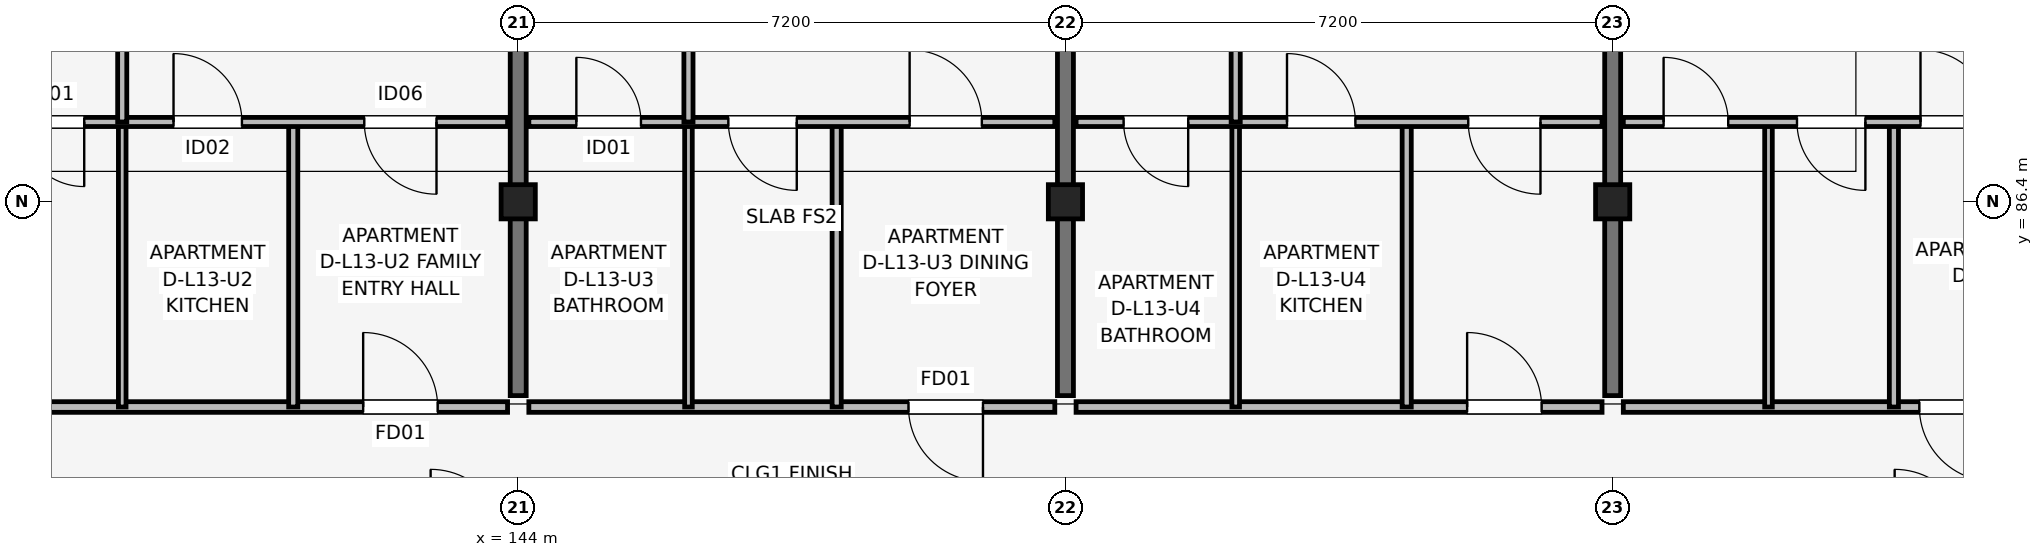
"""IFC4 building model, lengths in metres.
Left out: names, types, materials, properties, quantities, classifications, styles, units other than length and angle.
Written with IfcOpenShell. Run it as: python <this file> out.ifc"""

import sys

from ifc_helpers import new_model, si_unit, direction, frame, frame_2d, origin, origin_2d, place, context, subcontext, project, spatial, rectangle, extrude, element, fill, save


model = new_model("IFC4")
c1 = context("Model", 3, precision=1e-05, world=origin(), true_north=direction((0.0, 1.0)))
c2 = subcontext(c1, "Body", "Model", "MODEL_VIEW")
j1 = project(units=[si_unit("LENGTHUNIT", "METRE"), si_unit("PLANEANGLEUNIT", "RADIAN")], contexts=[c1])
p1 = place(None, origin())
s1 = spatial("IfcSite", under=j1, at=p1, CompositionType="ELEMENT")
p2 = place(p1, origin())
s2 = spatial("IfcBuilding", under=s1, at=p2, CompositionType="ELEMENT")
p3 = place(p2, frame((0.0, 0.0, 43.35)))
s3 = spatial("IfcBuildingStorey", under=s2, at=p3, CompositionType="ELEMENT", Elevation=43.35)
for number, where, z_axis, x_axis in (
    (1, (144.0, 86.4, 0.0), (0.0, 0.0, 1.0), (1.0, 0.0, 0.0)),
    (2, (151.2, 86.4, 0.0), (0.0, 0.0, 1.0), (1.0, 0.0, 0.0)),
    (3, (158.4, 86.4, 0.0), (0.0, 0.0, 1.0), (1.0, 0.0, 0.0)),
):
    element("IfcColumn", number, at=place(p3, frame(where, z_axis=z_axis, x_axis=x_axis)), inside=s3, PredefinedType="COLUMN", context=c2, shape_type="SweptSolid", body=[
        extrude(rectangle(XDim=0.45, YDim=0.45, at=origin_2d()), origin(), (0.0, 0.0, 1.0), 3.15),
    ])
for number, where, z_axis, x_axis in (
    (4, (144.0, 83.85, 0.0), (0.0, 0.0, 1.0), (0.0, 1.0, 0.0)),
    (5, (151.2, 83.85, 0.0), (0.0, 0.0, 1.0), (0.0, 1.0, 0.0)),
    (6, (158.4, 83.85, 0.0), (0.0, 0.0, 1.0), (0.0, 1.0, 0.0)),
):
    element("IfcWall", number, at=place(p3, frame(where, z_axis=z_axis, x_axis=x_axis)), inside=s3, PredefinedType="SHEAR", context=c2, shape_type="SweptSolid", body=[
        extrude(rectangle(XDim=9.4, YDim=0.21, at=frame_2d((4.7, 0.0))), origin(), (0.0, 0.0, 1.0), 3.15),
    ])
p4 = place(p3, frame((136.94, 83.7, 0.0), z_axis=(0.0, 0.0, 1.0), x_axis=(1.0, 0.0, 0.0)))
e7 = element("IfcWall", 7, at=p4, inside=s3, PredefinedType="PARTITIONING", context=c2, shape_type="SweptSolid", body=[
    extrude(rectangle(XDim=6.92, YDim=0.14, at=frame_2d((3.46, 0.0))), origin(), (0.0, 0.0, 1.0), 2.38),
])
p5 = place(p4, frame((5.02, 0.0, 0.0)))
e8 = element("IfcOpeningElement", 8, at=p5, cuts=e7, PredefinedType="OPENING", context=c2, shape_type="SweptSolid", body=[
    extrude(rectangle(XDim=0.98, YDim=2.1, at=frame_2d((0.49, 1.05))), frame((0.0, 0.08, 0.0), z_axis=(0.0, -1.0, 0.0), x_axis=(1.0, 0.0, 0.0)), (0.0, 0.0, 1.0), 0.16),
])
p6 = place(p3, frame((138.79, 83.7, 0.0), z_axis=(0.0, 0.0, 1.0), x_axis=(0.0, 1.0, 0.0)))
e9 = element("IfcWall", 9, at=p6, inside=s3, PredefinedType="PARTITIONING", context=c2, shape_type="SweptSolid", body=[
    extrude(rectangle(XDim=3.75, YDim=0.1, at=frame_2d((1.875, 0.0))), origin(), (0.0, 0.0, 1.0), 2.38),
])
p7 = place(p3, frame((141.04, 83.7, 0.0), z_axis=(0.0, 0.0, 1.0), x_axis=(0.0, 1.0, 0.0)))
e10 = element("IfcWall", 10, at=p7, inside=s3, PredefinedType="PARTITIONING", context=c2, shape_type="SweptSolid", body=[
    extrude(rectangle(XDim=3.75, YDim=0.12, at=frame_2d((1.875, 0.0))), origin(), (0.0, 0.0, 1.0), 2.38),
])
p8 = place(p3, frame((136.94, 87.45, 0.0), z_axis=(0.0, 0.0, 1.0), x_axis=(1.0, 0.0, 0.0)))
e11 = element("IfcWall", 11, at=p8, inside=s3, PredefinedType="PARTITIONING", context=c2, shape_type="SweptSolid", body=[
    extrude(rectangle(XDim=6.92, YDim=0.12, at=frame_2d((3.46, 0.0))), origin(), (0.0, 0.0, 1.0), 2.38),
])
p9 = place(p8, frame((1.35, 0.0, 0.0), z_axis=(0.0, 0.0, 1.0), x_axis=(-1.0, 0.0, 0.0)))
e12 = element("IfcOpeningElement", 12, at=p9, cuts=e11, PredefinedType="OPENING", context=c2, shape_type="SweptSolid", body=[
    extrude(rectangle(XDim=0.85, YDim=2.08, at=frame_2d((0.425, 1.04))), frame((0.0, 0.07, 0.0), z_axis=(0.0, -1.0, 0.0), x_axis=(1.0, 0.0, 0.0)), (0.0, 0.0, 1.0), 0.14),
])
p10 = place(p8, frame((2.525, 0.0, 0.0)))
e13 = element("IfcOpeningElement", 13, at=p10, cuts=e11, PredefinedType="OPENING", context=c2, shape_type="SweptSolid", body=[
    extrude(rectangle(XDim=0.9, YDim=2.08, at=frame_2d((0.45, 1.04))), frame((0.0, 0.07, 0.0), z_axis=(0.0, -1.0, 0.0), x_axis=(1.0, 0.0, 0.0)), (0.0, 0.0, 1.0), 0.14),
])
p11 = place(p8, frame((5.985, 0.0, 0.0), z_axis=(0.0, 0.0, 1.0), x_axis=(-1.0, 0.0, 0.0)))
e14 = element("IfcOpeningElement", 14, at=p11, cuts=e11, PredefinedType="OPENING", context=c2, shape_type="SweptSolid", body=[
    extrude(rectangle(XDim=0.95, YDim=2.08, at=frame_2d((0.475, 1.04))), frame((0.0, 0.07, 0.0), z_axis=(0.0, -1.0, 0.0), x_axis=(1.0, 0.0, 0.0)), (0.0, 0.0, 1.0), 0.14),
])
p12 = place(p3, frame((138.79, 87.45, 0.0), z_axis=(0.0, 0.0, 1.0), x_axis=(0.0, 1.0, 0.0)))
e15 = element("IfcWall", 15, at=p12, inside=s3, PredefinedType="PARTITIONING", context=c2, shape_type="SweptSolid", body=[
    extrude(rectangle(XDim=5.85, YDim=0.12, at=frame_2d((2.925, 0.0))), origin(), (0.0, 0.0, 1.0), 2.38),
])
p13 = place(p12, frame((2.475, 0.0, 0.0)))
e16 = element("IfcOpeningElement", 16, at=p13, cuts=e15, PredefinedType="OPENING", context=c2, shape_type="SweptSolid", body=[
    extrude(rectangle(XDim=0.9, YDim=2.08, at=frame_2d((0.45, 1.04))), frame((0.0, 0.07, 0.0), z_axis=(0.0, -1.0, 0.0), x_axis=(1.0, 0.0, 0.0)), (0.0, 0.0, 1.0), 0.14),
])
p14 = place(p3, frame((144.14, 83.7, 0.0), z_axis=(0.0, 0.0, 1.0), x_axis=(1.0, 0.0, 0.0)))
e17 = element("IfcWall", 17, at=p14, inside=s3, PredefinedType="PARTITIONING", context=c2, shape_type="SweptSolid", body=[
    extrude(rectangle(XDim=6.92, YDim=0.14, at=frame_2d((3.46, 0.0))), origin(), (0.0, 0.0, 1.0), 2.38),
])
p15 = place(p14, frame((5.975, 0.0, 0.0), z_axis=(0.0, 0.0, 1.0), x_axis=(-1.0, 0.0, 0.0)))
e18 = element("IfcOpeningElement", 18, at=p15, cuts=e17, PredefinedType="OPENING", context=c2, shape_type="SweptSolid", body=[
    extrude(rectangle(XDim=0.98, YDim=2.1, at=frame_2d((0.49, 1.05))), frame((0.0, 0.08, 0.0), z_axis=(0.0, -1.0, 0.0), x_axis=(1.0, 0.0, 0.0)), (0.0, 0.0, 1.0), 0.16),
])
p16 = place(p3, frame((146.24, 83.7, 0.0), z_axis=(0.0, 0.0, 1.0), x_axis=(0.0, 1.0, 0.0)))
e19 = element("IfcWall", 19, at=p16, inside=s3, PredefinedType="PARTITIONING", context=c2, shape_type="SweptSolid", body=[
    extrude(rectangle(XDim=3.75, YDim=0.1, at=frame_2d((1.875, 0.0))), origin(), (0.0, 0.0, 1.0), 2.38),
])
p17 = place(p3, frame((148.19, 83.7, 0.0), z_axis=(0.0, 0.0, 1.0), x_axis=(0.0, 1.0, 0.0)))
e20 = element("IfcWall", 20, at=p17, inside=s3, PredefinedType="PARTITIONING", context=c2, shape_type="SweptSolid", body=[
    extrude(rectangle(XDim=3.75, YDim=0.12, at=frame_2d((1.875, 0.0))), origin(), (0.0, 0.0, 1.0), 2.38),
])
p18 = place(p3, frame((144.14, 87.45, 0.0), z_axis=(0.0, 0.0, 1.0), x_axis=(1.0, 0.0, 0.0)))
e21 = element("IfcWall", 21, at=p18, inside=s3, PredefinedType="PARTITIONING", context=c2, shape_type="SweptSolid", body=[
    extrude(rectangle(XDim=6.92, YDim=0.12, at=frame_2d((3.46, 0.0))), origin(), (0.0, 0.0, 1.0), 2.38),
])
p19 = place(p18, frame((0.625, 0.0, 0.0)))
e22 = element("IfcOpeningElement", 22, at=p19, cuts=e21, PredefinedType="OPENING", context=c2, shape_type="SweptSolid", body=[
    extrude(rectangle(XDim=0.85, YDim=2.08, at=frame_2d((0.425, 1.04))), frame((0.0, 0.07, 0.0), z_axis=(0.0, -1.0, 0.0), x_axis=(1.0, 0.0, 0.0)), (0.0, 0.0, 1.0), 0.14),
])
p20 = place(p18, frame((3.525, 0.0, 0.0), z_axis=(0.0, 0.0, 1.0), x_axis=(-1.0, 0.0, 0.0)))
e23 = element("IfcOpeningElement", 23, at=p20, cuts=e21, PredefinedType="OPENING", context=c2, shape_type="SweptSolid", body=[
    extrude(rectangle(XDim=0.9, YDim=2.08, at=frame_2d((0.45, 1.04))), frame((0.0, 0.07, 0.0), z_axis=(0.0, -1.0, 0.0), x_axis=(1.0, 0.0, 0.0)), (0.0, 0.0, 1.0), 0.14),
])
p21 = place(p18, frame((5.01, 0.0, 0.0)))
e24 = element("IfcOpeningElement", 24, at=p21, cuts=e21, PredefinedType="OPENING", context=c2, shape_type="SweptSolid", body=[
    extrude(rectangle(XDim=0.95, YDim=2.08, at=frame_2d((0.475, 1.04))), frame((0.0, 0.07, 0.0), z_axis=(0.0, -1.0, 0.0), x_axis=(1.0, 0.0, 0.0)), (0.0, 0.0, 1.0), 0.14),
])
p22 = place(p3, frame((146.24, 87.45, 0.0), z_axis=(0.0, 0.0, 1.0), x_axis=(0.0, 1.0, 0.0)))
e25 = element("IfcWall", 25, at=p22, inside=s3, PredefinedType="PARTITIONING", context=c2, shape_type="SweptSolid", body=[
    extrude(rectangle(XDim=5.85, YDim=0.12, at=frame_2d((2.925, 0.0))), origin(), (0.0, 0.0, 1.0), 2.38),
])
p23 = place(p22, frame((3.375, 0.0, 0.0), z_axis=(0.0, 0.0, 1.0), x_axis=(-1.0, 0.0, 0.0)))
e26 = element("IfcOpeningElement", 26, at=p23, cuts=e25, PredefinedType="OPENING", context=c2, shape_type="SweptSolid", body=[
    extrude(rectangle(XDim=0.9, YDim=2.08, at=frame_2d((0.45, 1.04))), frame((0.0, 0.07, 0.0), z_axis=(0.0, -1.0, 0.0), x_axis=(1.0, 0.0, 0.0)), (0.0, 0.0, 1.0), 0.14),
])
p24 = place(p3, frame((151.34, 83.7, 0.0), z_axis=(0.0, 0.0, 1.0), x_axis=(1.0, 0.0, 0.0)))
e27 = element("IfcWall", 27, at=p24, inside=s3, PredefinedType="PARTITIONING", context=c2, shape_type="SweptSolid", body=[
    extrude(rectangle(XDim=6.92, YDim=0.14, at=frame_2d((3.46, 0.0))), origin(), (0.0, 0.0, 1.0), 2.38),
])
p25 = place(p24, frame((5.145, 0.0, 0.0)))
e28 = element("IfcOpeningElement", 28, at=p25, cuts=e27, PredefinedType="OPENING", context=c2, shape_type="SweptSolid", body=[
    extrude(rectangle(XDim=0.98, YDim=2.1, at=frame_2d((0.49, 1.05))), frame((0.0, 0.08, 0.0), z_axis=(0.0, -1.0, 0.0), x_axis=(1.0, 0.0, 0.0)), (0.0, 0.0, 1.0), 0.16),
])
p26 = place(p3, frame((153.44, 83.7, 0.0), z_axis=(0.0, 0.0, 1.0), x_axis=(0.0, 1.0, 0.0)))
e29 = element("IfcWall", 29, at=p26, inside=s3, PredefinedType="PARTITIONING", context=c2, shape_type="SweptSolid", body=[
    extrude(rectangle(XDim=3.75, YDim=0.1, at=frame_2d((1.875, 0.0))), origin(), (0.0, 0.0, 1.0), 2.38),
])
p27 = place(p3, frame((155.69, 83.7, 0.0), z_axis=(0.0, 0.0, 1.0), x_axis=(0.0, 1.0, 0.0)))
e30 = element("IfcWall", 30, at=p27, inside=s3, PredefinedType="PARTITIONING", context=c2, shape_type="SweptSolid", body=[
    extrude(rectangle(XDim=3.75, YDim=0.12, at=frame_2d((1.875, 0.0))), origin(), (0.0, 0.0, 1.0), 2.38),
])
p28 = place(p3, frame((151.34, 87.45, 0.0), z_axis=(0.0, 0.0, 1.0), x_axis=(1.0, 0.0, 0.0)))
e31 = element("IfcWall", 31, at=p28, inside=s3, PredefinedType="PARTITIONING", context=c2, shape_type="SweptSolid", body=[
    extrude(rectangle(XDim=6.92, YDim=0.12, at=frame_2d((3.46, 0.0))), origin(), (0.0, 0.0, 1.0), 2.38),
])
p29 = place(p28, frame((1.475, 0.0, 0.0), z_axis=(0.0, 0.0, 1.0), x_axis=(-1.0, 0.0, 0.0)))
e32 = element("IfcOpeningElement", 32, at=p29, cuts=e31, PredefinedType="OPENING", context=c2, shape_type="SweptSolid", body=[
    extrude(rectangle(XDim=0.85, YDim=2.08, at=frame_2d((0.425, 1.04))), frame((0.0, 0.07, 0.0), z_axis=(0.0, -1.0, 0.0), x_axis=(1.0, 0.0, 0.0)), (0.0, 0.0, 1.0), 0.14),
])
p30 = place(p28, frame((2.775, 0.0, 0.0)))
e33 = element("IfcOpeningElement", 33, at=p30, cuts=e31, PredefinedType="OPENING", context=c2, shape_type="SweptSolid", body=[
    extrude(rectangle(XDim=0.9, YDim=2.08, at=frame_2d((0.45, 1.04))), frame((0.0, 0.07, 0.0), z_axis=(0.0, -1.0, 0.0), x_axis=(1.0, 0.0, 0.0)), (0.0, 0.0, 1.0), 0.14),
])
p31 = place(p28, frame((6.11, 0.0, 0.0), z_axis=(0.0, 0.0, 1.0), x_axis=(-1.0, 0.0, 0.0)))
e34 = element("IfcOpeningElement", 34, at=p31, cuts=e31, PredefinedType="OPENING", context=c2, shape_type="SweptSolid", body=[
    extrude(rectangle(XDim=0.95, YDim=2.08, at=frame_2d((0.475, 1.04))), frame((0.0, 0.07, 0.0), z_axis=(0.0, -1.0, 0.0), x_axis=(1.0, 0.0, 0.0)), (0.0, 0.0, 1.0), 0.14),
])
p32 = place(p3, frame((153.44, 87.45, 0.0), z_axis=(0.0, 0.0, 1.0), x_axis=(0.0, 1.0, 0.0)))
e35 = element("IfcWall", 35, at=p32, inside=s3, PredefinedType="PARTITIONING", context=c2, shape_type="SweptSolid", body=[
    extrude(rectangle(XDim=5.85, YDim=0.12, at=frame_2d((2.925, 0.0))), origin(), (0.0, 0.0, 1.0), 2.38),
])
p33 = place(p32, frame((2.475, 0.0, 0.0)))
e36 = element("IfcOpeningElement", 36, at=p33, cuts=e35, PredefinedType="OPENING", context=c2, shape_type="SweptSolid", body=[
    extrude(rectangle(XDim=0.9, YDim=2.08, at=frame_2d((0.45, 1.04))), frame((0.0, 0.07, 0.0), z_axis=(0.0, -1.0, 0.0), x_axis=(1.0, 0.0, 0.0)), (0.0, 0.0, 1.0), 0.14),
])
p34 = place(p3, frame((158.54, 83.7, 0.0), z_axis=(0.0, 0.0, 1.0), x_axis=(1.0, 0.0, 0.0)))
e37 = element("IfcWall", 37, at=p34, inside=s3, PredefinedType="PARTITIONING", context=c2, shape_type="SweptSolid", body=[
    extrude(rectangle(XDim=6.92, YDim=0.14, at=frame_2d((3.46, 0.0))), origin(), (0.0, 0.0, 1.0), 2.38),
])
p35 = place(p34, frame((4.875, 0.0, 0.0), z_axis=(0.0, 0.0, 1.0), x_axis=(-1.0, 0.0, 0.0)))
e38 = element("IfcOpeningElement", 38, at=p35, cuts=e37, PredefinedType="OPENING", context=c2, shape_type="SweptSolid", body=[
    extrude(rectangle(XDim=0.98, YDim=2.1, at=frame_2d((0.49, 1.05))), frame((0.0, 0.08, 0.0), z_axis=(0.0, -1.0, 0.0), x_axis=(1.0, 0.0, 0.0)), (0.0, 0.0, 1.0), 0.16),
])
p36 = place(p3, frame((160.45, 83.7, 0.0), z_axis=(0.0, 0.0, 1.0), x_axis=(0.0, 1.0, 0.0)))
e39 = element("IfcWall", 39, at=p36, inside=s3, PredefinedType="PARTITIONING", context=c2, shape_type="SweptSolid", body=[
    extrude(rectangle(XDim=3.75, YDim=0.1, at=frame_2d((1.875, 0.0))), origin(), (0.0, 0.0, 1.0), 2.38),
])
p37 = place(p3, frame((162.1, 83.7, 0.0), z_axis=(0.0, 0.0, 1.0), x_axis=(0.0, 1.0, 0.0)))
e40 = element("IfcWall", 40, at=p37, inside=s3, PredefinedType="PARTITIONING", context=c2, shape_type="SweptSolid", body=[
    extrude(rectangle(XDim=3.75, YDim=0.12, at=frame_2d((1.875, 0.0))), origin(), (0.0, 0.0, 1.0), 2.38),
])
p38 = place(p3, frame((158.54, 87.45, 0.0), z_axis=(0.0, 0.0, 1.0), x_axis=(1.0, 0.0, 0.0)))
e41 = element("IfcWall", 41, at=p38, inside=s3, PredefinedType="PARTITIONING", context=c2, shape_type="SweptSolid", body=[
    extrude(rectangle(XDim=6.92, YDim=0.12, at=frame_2d((3.46, 0.0))), origin(), (0.0, 0.0, 1.0), 2.38),
])
p39 = place(p38, frame((0.53, 0.0, 0.0)))
e42 = element("IfcOpeningElement", 42, at=p39, cuts=e41, PredefinedType="OPENING", context=c2, shape_type="SweptSolid", body=[
    extrude(rectangle(XDim=0.85, YDim=2.08, at=frame_2d((0.425, 1.04))), frame((0.0, 0.07, 0.0), z_axis=(0.0, -1.0, 0.0), x_axis=(1.0, 0.0, 0.0)), (0.0, 0.0, 1.0), 0.14),
])
p40 = place(p38, frame((3.185, 0.0, 0.0), z_axis=(0.0, 0.0, 1.0), x_axis=(-1.0, 0.0, 0.0)))
e43 = element("IfcOpeningElement", 43, at=p40, cuts=e41, PredefinedType="OPENING", context=c2, shape_type="SweptSolid", body=[
    extrude(rectangle(XDim=0.9, YDim=2.08, at=frame_2d((0.45, 1.04))), frame((0.0, 0.07, 0.0), z_axis=(0.0, -1.0, 0.0), x_axis=(1.0, 0.0, 0.0)), (0.0, 0.0, 1.0), 0.14),
])
p41 = place(p38, frame((3.91, 0.0, 0.0)))
e44 = element("IfcOpeningElement", 44, at=p41, cuts=e41, PredefinedType="OPENING", context=c2, shape_type="SweptSolid", body=[
    extrude(rectangle(XDim=0.95, YDim=2.08, at=frame_2d((0.475, 1.04))), frame((0.0, 0.07, 0.0), z_axis=(0.0, -1.0, 0.0), x_axis=(1.0, 0.0, 0.0)), (0.0, 0.0, 1.0), 0.14),
])
p42 = place(p5, origin())
e45 = element("IfcDoor", 45, at=p42, inside=s3, OperationType="SINGLE_SWING_LEFT", PredefinedType="DOOR", context=c2, shape_type="SweptSolid", body=[
    extrude(rectangle(XDim=0.98, YDim=2.1, at=frame_2d((0.49, 1.05))), frame((0.0, 0.025, 0.0), z_axis=(0.0, -1.0, 0.0), x_axis=(1.0, 0.0, 0.0)), (0.0, 0.0, 1.0), 0.05),
])
fill(e8, e45)
p43 = place(p9, origin())
e46 = element("IfcDoor", 46, at=p43, inside=s3, OperationType="SINGLE_SWING_RIGHT", PredefinedType="DOOR", context=c2, shape_type="SweptSolid", body=[
    extrude(rectangle(XDim=0.85, YDim=2.08, at=frame_2d((0.425, 1.04))), frame((0.0, 0.025, 0.0), z_axis=(0.0, -1.0, 0.0), x_axis=(1.0, 0.0, 0.0)), (0.0, 0.0, 1.0), 0.05),
])
fill(e12, e46)
p44 = place(p10, origin())
e47 = element("IfcDoor", 47, at=p44, inside=s3, OperationType="SINGLE_SWING_LEFT", PredefinedType="DOOR", context=c2, shape_type="SweptSolid", body=[
    extrude(rectangle(XDim=0.9, YDim=2.08, at=frame_2d((0.45, 1.04))), frame((0.0, 0.025, 0.0), z_axis=(0.0, -1.0, 0.0), x_axis=(1.0, 0.0, 0.0)), (0.0, 0.0, 1.0), 0.05),
])
fill(e13, e47)
p45 = place(p11, origin())
e48 = element("IfcDoor", 48, at=p45, inside=s3, OperationType="SINGLE_SWING_RIGHT", PredefinedType="DOOR", context=c2, shape_type="SweptSolid", body=[
    extrude(rectangle(XDim=0.95, YDim=2.08, at=frame_2d((0.475, 1.04))), frame((0.0, 0.025, 0.0), z_axis=(0.0, -1.0, 0.0), x_axis=(1.0, 0.0, 0.0)), (0.0, 0.0, 1.0), 0.05),
])
fill(e14, e48)
p46 = place(p15, origin())
e49 = element("IfcDoor", 49, at=p46, inside=s3, OperationType="SINGLE_SWING_RIGHT", PredefinedType="DOOR", context=c2, shape_type="SweptSolid", body=[
    extrude(rectangle(XDim=0.98, YDim=2.1, at=frame_2d((0.49, 1.05))), frame((0.0, 0.025, 0.0), z_axis=(0.0, -1.0, 0.0), x_axis=(1.0, 0.0, 0.0)), (0.0, 0.0, 1.0), 0.05),
])
fill(e18, e49)
p47 = place(p19, origin())
e50 = element("IfcDoor", 50, at=p47, inside=s3, OperationType="SINGLE_SWING_LEFT", PredefinedType="DOOR", context=c2, shape_type="SweptSolid", body=[
    extrude(rectangle(XDim=0.85, YDim=2.08, at=frame_2d((0.425, 1.04))), frame((0.0, 0.025, 0.0), z_axis=(0.0, -1.0, 0.0), x_axis=(1.0, 0.0, 0.0)), (0.0, 0.0, 1.0), 0.05),
])
fill(e22, e50)
p48 = place(p20, origin())
e51 = element("IfcDoor", 51, at=p48, inside=s3, OperationType="SINGLE_SWING_RIGHT", PredefinedType="DOOR", context=c2, shape_type="SweptSolid", body=[
    extrude(rectangle(XDim=0.9, YDim=2.08, at=frame_2d((0.45, 1.04))), frame((0.0, 0.025, 0.0), z_axis=(0.0, -1.0, 0.0), x_axis=(1.0, 0.0, 0.0)), (0.0, 0.0, 1.0), 0.05),
])
fill(e23, e51)
p49 = place(p21, origin())
e52 = element("IfcDoor", 52, at=p49, inside=s3, OperationType="SINGLE_SWING_LEFT", PredefinedType="DOOR", context=c2, shape_type="SweptSolid", body=[
    extrude(rectangle(XDim=0.95, YDim=2.08, at=frame_2d((0.475, 1.04))), frame((0.0, 0.025, 0.0), z_axis=(0.0, -1.0, 0.0), x_axis=(1.0, 0.0, 0.0)), (0.0, 0.0, 1.0), 0.05),
])
fill(e24, e52)
p50 = place(p25, origin())
e53 = element("IfcDoor", 53, at=p50, inside=s3, OperationType="SINGLE_SWING_LEFT", PredefinedType="DOOR", context=c2, shape_type="SweptSolid", body=[
    extrude(rectangle(XDim=0.98, YDim=2.1, at=frame_2d((0.49, 1.05))), frame((0.0, 0.025, 0.0), z_axis=(0.0, -1.0, 0.0), x_axis=(1.0, 0.0, 0.0)), (0.0, 0.0, 1.0), 0.05),
])
fill(e28, e53)
p51 = place(p29, origin())
e54 = element("IfcDoor", 54, at=p51, inside=s3, OperationType="SINGLE_SWING_RIGHT", PredefinedType="DOOR", context=c2, shape_type="SweptSolid", body=[
    extrude(rectangle(XDim=0.85, YDim=2.08, at=frame_2d((0.425, 1.04))), frame((0.0, 0.025, 0.0), z_axis=(0.0, -1.0, 0.0), x_axis=(1.0, 0.0, 0.0)), (0.0, 0.0, 1.0), 0.05),
])
fill(e32, e54)
p52 = place(p30, origin())
e55 = element("IfcDoor", 55, at=p52, inside=s3, OperationType="SINGLE_SWING_LEFT", PredefinedType="DOOR", context=c2, shape_type="SweptSolid", body=[
    extrude(rectangle(XDim=0.9, YDim=2.08, at=frame_2d((0.45, 1.04))), frame((0.0, 0.025, 0.0), z_axis=(0.0, -1.0, 0.0), x_axis=(1.0, 0.0, 0.0)), (0.0, 0.0, 1.0), 0.05),
])
fill(e33, e55)
p53 = place(p31, origin())
e56 = element("IfcDoor", 56, at=p53, inside=s3, OperationType="SINGLE_SWING_RIGHT", PredefinedType="DOOR", context=c2, shape_type="SweptSolid", body=[
    extrude(rectangle(XDim=0.95, YDim=2.08, at=frame_2d((0.475, 1.04))), frame((0.0, 0.025, 0.0), z_axis=(0.0, -1.0, 0.0), x_axis=(1.0, 0.0, 0.0)), (0.0, 0.0, 1.0), 0.05),
])
fill(e34, e56)
p54 = place(p35, origin())
e57 = element("IfcDoor", 57, at=p54, inside=s3, OperationType="SINGLE_SWING_RIGHT", PredefinedType="DOOR", context=c2, shape_type="SweptSolid", body=[
    extrude(rectangle(XDim=0.98, YDim=2.1, at=frame_2d((0.49, 1.05))), frame((0.0, 0.025, 0.0), z_axis=(0.0, -1.0, 0.0), x_axis=(1.0, 0.0, 0.0)), (0.0, 0.0, 1.0), 0.05),
])
fill(e38, e57)
p55 = place(p39, origin())
e58 = element("IfcDoor", 58, at=p55, inside=s3, OperationType="SINGLE_SWING_LEFT", PredefinedType="DOOR", context=c2, shape_type="SweptSolid", body=[
    extrude(rectangle(XDim=0.85, YDim=2.08, at=frame_2d((0.425, 1.04))), frame((0.0, 0.025, 0.0), z_axis=(0.0, -1.0, 0.0), x_axis=(1.0, 0.0, 0.0)), (0.0, 0.0, 1.0), 0.05),
])
fill(e42, e58)
p56 = place(p40, origin())
e59 = element("IfcDoor", 59, at=p56, inside=s3, OperationType="SINGLE_SWING_RIGHT", PredefinedType="DOOR", context=c2, shape_type="SweptSolid", body=[
    extrude(rectangle(XDim=0.9, YDim=2.08, at=frame_2d((0.45, 1.04))), frame((0.0, 0.025, 0.0), z_axis=(0.0, -1.0, 0.0), x_axis=(1.0, 0.0, 0.0)), (0.0, 0.0, 1.0), 0.05),
])
fill(e43, e59)
p57 = place(p41, origin())
e60 = element("IfcDoor", 60, at=p57, inside=s3, OperationType="SINGLE_SWING_LEFT", PredefinedType="DOOR", context=c2, shape_type="SweptSolid", body=[
    extrude(rectangle(XDim=0.95, YDim=2.08, at=frame_2d((0.475, 1.04))), frame((0.0, 0.025, 0.0), z_axis=(0.0, -1.0, 0.0), x_axis=(1.0, 0.0, 0.0)), (0.0, 0.0, 1.0), 0.05),
])
fill(e44, e60)
save(model, sys.argv[1])
